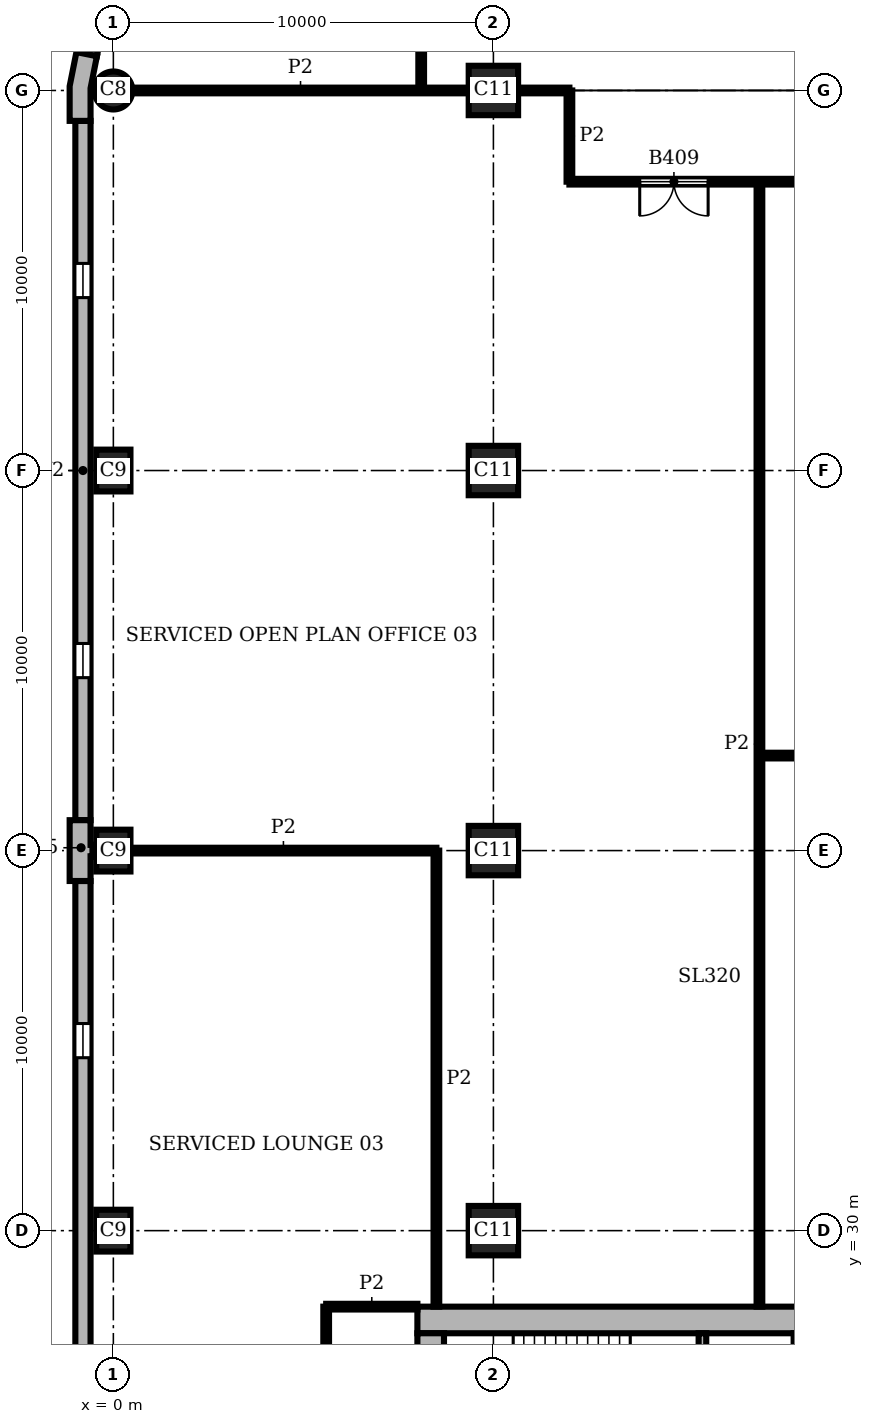
"""IFC4 building model, lengths in metres.
Left out: names, types, materials, properties, quantities, classifications, styles, units other than length and angle.
Written with IfcOpenShell. Run it as: python <this file> out.ifc"""

import sys

from ifc_helpers import new_model, si_unit, direction, frame, frame_2d, origin, origin_2d, place, context, subcontext, project, spatial, polyline, rectangle, circle, outline, extrude, element, fill, save


model = new_model("IFC4")
c1 = context("Model", 3, precision=1e-05, world=origin(), true_north=direction((0.0, 1.0)))
c2 = subcontext(c1, "Body", "Model", "MODEL_VIEW")
j1 = project(units=[si_unit("LENGTHUNIT", "METRE"), si_unit("PLANEANGLEUNIT", "RADIAN")], contexts=[c1])
p1 = place(None, origin())
s1 = spatial("IfcSite", under=j1, at=p1, CompositionType="ELEMENT")
p2 = place(p1, origin())
s2 = spatial("IfcBuilding", under=s1, at=p2, CompositionType="ELEMENT")
p3 = place(p2, frame((0.0, 0.0, 166.8)))
s3 = spatial("IfcBuildingStorey", under=s2, at=p3, CompositionType="ELEMENT", Elevation=166.8)
p4 = place(p3, frame((0.0, 60.0, 0.0), z_axis=(0.0, 0.0, 1.0), x_axis=(1.0, 0.0, 0.0)))
e1 = element("IfcColumn", 1, at=p4, inside=s3, PredefinedType="COLUMN", context=c2, shape_type="SweptSolid", body=[
    extrude(circle(Radius=0.5, at=origin_2d()), origin(), (0.0, 0.0, 1.0), 3.9),
])
for number, where, z_axis, x_axis in (
    (2, (0.0, 50.0, 0.0), (0.0, 0.0, 1.0), (0.0, 1.0, 0.0)),
    (3, (0.0, 40.0, 0.0), (0.0, 0.0, 1.0), (0.0, 1.0, 0.0)),
    (4, (0.0, 30.0, 0.0), (0.0, 0.0, 1.0), (0.0, 1.0, 0.0)),
):
    element("IfcColumn", number, at=place(p3, frame(where, z_axis=z_axis, x_axis=x_axis)), inside=s3, PredefinedType="COLUMN", context=c2, shape_type="SweptSolid", body=[
        extrude(rectangle(XDim=1.1, YDim=0.9, at=origin_2d()), origin(), (0.0, 0.0, 1.0), 3.9),
    ])
for number, where, z_axis, x_axis in (
    (5, (10.0, 30.0, 0.0), (0.0, 0.0, 1.0), (1.0, 0.0, 0.0)),
    (6, (10.0, 40.0, 0.0), (0.0, 0.0, 1.0), (1.0, 0.0, 0.0)),
    (7, (10.0, 50.0, 0.0), (0.0, 0.0, 1.0), (1.0, 0.0, 0.0)),
    (8, (10.0, 60.0, 0.0), (0.0, 0.0, 1.0), (1.0, 0.0, 0.0)),
):
    element("IfcColumn", number, at=place(p3, frame(where, z_axis=z_axis, x_axis=x_axis)), inside=s3, PredefinedType="COLUMN", context=c2, shape_type="SweptSolid", body=[
        extrude(rectangle(XDim=1.3, YDim=1.3, at=origin_2d()), origin(), (0.0, 0.0, 1.0), 3.9),
    ])
p5 = place(p3, frame((28.0, 27.65, 0.0), z_axis=(0.0, 0.0, 1.0), x_axis=(-1.0, 0.0, 0.0)))
e9 = element("IfcWall", 9, at=p5, inside=s3, PredefinedType="SHEAR", context=c2, shape_type="SweptSolid", body=[
    extrude(rectangle(XDim=20.0, YDim=0.7, at=frame_2d((10.0, 0.0))), origin(), (0.0, 0.0, 1.0), 3.9),
])
p6 = place(p3, frame((8.35, 27.3, 0.0), z_axis=(0.0, 0.0, 1.0), x_axis=(0.0, -1.0, 0.0)))
e10 = element("IfcWall", 10, at=p6, inside=s3, PredefinedType="SHEAR", context=c2, shape_type="SweptSolid", body=[
    extrude(rectangle(XDim=18.6, YDim=0.7, at=frame_2d((9.3, 0.0))), origin(), (0.0, 0.0, 1.0), 3.9),
])
p7 = place(p3, origin())
e11 = element("IfcWall", 11, at=p7, inside=s3, PredefinedType="SOLIDWALL", context=c2, shape_type="SweptSolid", body=[
    extrude(outline(polyline([(-0.825, 60.98), (-0.972, 61.009), (-1.15, 60.113), (-1.15, 59.2), (-1.0, 59.2), (-0.6, 59.2), (-0.6, 60.059), (-0.432, 60.902), (-0.825, 60.98)])), origin(), (0.0, 0.0, 1.0), 3.9),
])
e12 = element("IfcWall", 12, at=p7, inside=s3, PredefinedType="SOLIDWALL", context=c2, shape_type="SweptSolid", body=[
    extrude(outline(polyline([(-0.6, 39.2), (-0.6, 39.85), (-0.55, 39.85), (-0.55, 40.15), (-0.6, 40.15), (-0.6, 40.8), (-1.0, 40.8), (-1.15, 40.8), (-1.15, 40.0), (-1.15, 39.2), (-1.0, 39.2), (-0.6, 39.2)])), origin(), (0.0, 0.0, 1.0), 3.9),
])
p8 = place(p3, frame((0.299, 65.602, 0.0), z_axis=(0.0, 0.0, 1.0), x_axis=(-0.195098533057, -0.98078364709, 0.0)))
e13 = element("IfcWall", 13, at=p8, inside=s3, PredefinedType="SOLIDWALL", context=c2, shape_type="SweptSolid", body=[
    extrude(rectangle(XDim=4.753, YDim=0.4, at=frame_2d((2.376, 0.0))), origin(), (0.0, 0.0, 1.0), 3.9),
])
p9 = place(p8, frame((0.226, 0.0, 0.9)))
e14 = element("IfcOpeningElement", 14, at=p9, cuts=e13, PredefinedType="OPENING", context=c2, shape_type="SweptSolid", body=[
    extrude(rectangle(XDim=4.3, YDim=2.35, at=frame_2d((2.15, 1.175))), frame((0.0, 0.21, 0.0), z_axis=(0.0, -1.0, 0.0), x_axis=(1.0, 0.0, 0.0)), (0.0, 0.0, 1.0), 0.42),
])
p10 = place(p3, frame((-0.8, 59.2, 0.0), z_axis=(0.0, 0.0, 1.0), x_axis=(0.0, -1.0, 0.0)))
e15 = element("IfcWall", 15, at=p10, inside=s3, PredefinedType="SOLIDWALL", context=c2, shape_type="SweptSolid", body=[
    extrude(rectangle(XDim=18.4, YDim=0.4, at=frame_2d((9.2, 0.0))), origin(), (0.0, 0.0, 1.0), 3.9),
])
p11 = place(p10, frame((3.75, 0.0, 0.9)))
e16 = element("IfcOpeningElement", 16, at=p11, cuts=e15, PredefinedType="OPENING", context=c2, shape_type="SweptSolid", body=[
    extrude(rectangle(XDim=0.9, YDim=2.35, at=frame_2d((0.45, 1.175))), frame((0.0, 0.21, 0.0), z_axis=(0.0, -1.0, 0.0), x_axis=(1.0, 0.0, 0.0)), (0.0, 0.0, 1.0), 0.42),
])
p12 = place(p10, frame((13.75, 0.0, 0.9)))
e17 = element("IfcOpeningElement", 17, at=p12, cuts=e15, PredefinedType="OPENING", context=c2, shape_type="SweptSolid", body=[
    extrude(rectangle(XDim=0.9, YDim=2.35, at=frame_2d((0.45, 1.175))), frame((0.0, 0.21, 0.0), z_axis=(0.0, -1.0, 0.0), x_axis=(1.0, 0.0, 0.0)), (0.0, 0.0, 1.0), 0.42),
])
p13 = place(p3, frame((-0.8, 39.2, 0.0), z_axis=(0.0, 0.0, 1.0), x_axis=(0.0, -1.0, 0.0)))
e18 = element("IfcWall", 18, at=p13, inside=s3, PredefinedType="SOLIDWALL", context=c2, shape_type="SweptSolid", body=[
    extrude(rectangle(XDim=18.4, YDim=0.4, at=frame_2d((9.2, 0.0))), origin(), (0.0, 0.0, 1.0), 3.9),
])
p14 = place(p13, frame((3.75, 0.0, 0.9)))
e19 = element("IfcOpeningElement", 19, at=p14, cuts=e18, PredefinedType="OPENING", context=c2, shape_type="SweptSolid", body=[
    extrude(rectangle(XDim=0.9, YDim=2.35, at=frame_2d((0.45, 1.175))), frame((0.0, 0.21, 0.0), z_axis=(0.0, -1.0, 0.0), x_axis=(1.0, 0.0, 0.0)), (0.0, 0.0, 1.0), 0.42),
])
p15 = place(p13, frame((13.75, 0.0, 0.9)))
e20 = element("IfcOpeningElement", 20, at=p15, cuts=e18, PredefinedType="OPENING", context=c2, shape_type="SweptSolid", body=[
    extrude(rectangle(XDim=0.9, YDim=2.35, at=frame_2d((0.45, 1.175))), frame((0.0, 0.21, 0.0), z_axis=(0.0, -1.0, 0.0), x_axis=(1.0, 0.0, 0.0)), (0.0, 0.0, 1.0), 0.42),
])
p16 = place(p3, frame((15.5, 23.6, 0.0), z_axis=(0.0, 0.0, 1.0), x_axis=(0.0, 1.0, 0.0)))
e21 = element("IfcWall", 21, at=p16, inside=s3, PredefinedType="SHEAR", context=c2, shape_type="SweptSolid", body=[
    extrude(rectangle(XDim=3.7, YDim=0.2, at=frame_2d((1.85, 0.0))), origin(), (0.0, 0.0, 1.0), 3.58),
])
p17 = place(p3, frame((18.0, 20.0, 0.0), z_axis=(0.0, 0.0, 1.0), x_axis=(0.0, 1.0, 0.0)))
e22 = element("IfcWall", 22, at=p17, inside=s3, PredefinedType="SHEAR", context=c2, shape_type="SweptSolid", body=[
    extrude(rectangle(XDim=7.3, YDim=0.2, at=frame_2d((3.65, 0.0))), origin(), (0.0, 0.0, 1.0), 3.58),
])
p18 = place(p17, frame((1.2, 0.0, 0.0)))
e23 = element("IfcOpeningElement", 23, at=p18, cuts=e22, PredefinedType="OPENING", context=c2, shape_type="SweptSolid", body=[
    extrude(rectangle(XDim=1.2, YDim=2.1, at=frame_2d((0.6, 1.05))), frame((0.0, 0.11, 0.0), z_axis=(0.0, -1.0, 0.0), x_axis=(1.0, 0.0, 0.0)), (0.0, 0.0, 1.0), 0.22),
])
p19 = place(p3, frame((5.6, 5.6, 0.0), z_axis=(0.0, 0.0, 1.0), x_axis=(0.0, 1.0, 0.0)))
e24 = element("IfcWall", 24, at=p19, inside=s3, PredefinedType="PARTITIONING", context=c2, shape_type="SweptSolid", body=[
    extrude(rectangle(XDim=22.4, YDim=0.15, at=frame_2d((11.2, 0.0))), origin(), (0.0, 0.0, 1.0), 3.58),
])
p20 = place(p19, frame((5.35, 0.0, 0.0)))
e25 = element("IfcOpeningElement", 25, at=p20, cuts=e24, PredefinedType="OPENING", context=c2, shape_type="SweptSolid", body=[
    extrude(rectangle(XDim=1.0, YDim=2.1, at=frame_2d((0.5, 1.05))), frame((0.0, 0.085, 0.0), z_axis=(0.0, -1.0, 0.0), x_axis=(1.0, 0.0, 0.0)), (0.0, 0.0, 1.0), 0.17),
])
p21 = place(p19, frame((11.25, 0.0, 0.0)))
e26 = element("IfcOpeningElement", 26, at=p21, cuts=e24, PredefinedType="OPENING", context=c2, shape_type="SweptSolid", body=[
    extrude(rectangle(XDim=1.0, YDim=2.1, at=frame_2d((0.5, 1.05))), frame((0.0, 0.085, 0.0), z_axis=(0.0, -1.0, 0.0), x_axis=(1.0, 0.0, 0.0)), (0.0, 0.0, 1.0), 0.17),
])
p22 = place(p19, frame((18.25, 0.0, 0.0)))
e27 = element("IfcOpeningElement", 27, at=p22, cuts=e24, PredefinedType="OPENING", context=c2, shape_type="SweptSolid", body=[
    extrude(rectangle(XDim=1.8, YDim=2.1, at=frame_2d((0.9, 1.05))), frame((0.0, 0.085, 0.0), z_axis=(0.0, -1.0, 0.0), x_axis=(1.0, 0.0, 0.0)), (0.0, 0.0, 1.0), 0.17),
])
p23 = place(p3, frame((8.1, 60.0, 0.0), z_axis=(0.0, 0.0, 1.0), x_axis=(0.0, 1.0, 0.0)))
e28 = element("IfcWall", 28, at=p23, inside=s3, PredefinedType="PARTITIONING", context=c2, shape_type="SweptSolid", body=[
    extrude(rectangle(XDim=6.4, YDim=0.15, at=frame_2d((3.2, 0.0))), origin(), (0.0, 0.0, 1.0), 3.58),
])
p24 = place(p23, frame((2.35, 0.0, 0.0)))
e29 = element("IfcOpeningElement", 29, at=p24, cuts=e28, PredefinedType="OPENING", context=c2, shape_type="SweptSolid", body=[
    extrude(rectangle(XDim=1.8, YDim=2.1, at=frame_2d((0.9, 1.05))), frame((0.0, 0.085, 0.0), z_axis=(0.0, -1.0, 0.0), x_axis=(1.0, 0.0, 0.0)), (0.0, 0.0, 1.0), 0.17),
])
p25 = place(p3, frame((8.5, 28.0, 0.0), z_axis=(0.0, 0.0, 1.0), x_axis=(0.0, 1.0, 0.0)))
e30 = element("IfcWall", 30, at=p25, inside=s3, PredefinedType="PARTITIONING", context=c2, shape_type="SweptSolid", body=[
    extrude(rectangle(XDim=12.0, YDim=0.15, at=frame_2d((6.0, 0.0))), origin(), (0.0, 0.0, 1.0), 3.58),
])
p26 = place(p3, frame((12.0, 57.6, 0.0), z_axis=(0.0, 0.0, 1.0), x_axis=(0.0, 1.0, 0.0)))
e31 = element("IfcWall", 31, at=p26, inside=s3, PredefinedType="PARTITIONING", context=c2, shape_type="SweptSolid", body=[
    extrude(rectangle(XDim=2.4, YDim=0.15, at=frame_2d((1.2, 0.0))), origin(), (0.0, 0.0, 1.0), 3.58),
])
p27 = place(p3, frame((17.0, 28.0, 0.0), z_axis=(0.0, 0.0, 1.0), x_axis=(0.0, 1.0, 0.0)))
e32 = element("IfcWall", 32, at=p27, inside=s3, PredefinedType="PARTITIONING", context=c2, shape_type="SweptSolid", body=[
    extrude(rectangle(XDim=29.6, YDim=0.15, at=frame_2d((14.8, 0.0))), origin(), (0.0, 0.0, 1.0), 3.58),
])
p28 = place(p3, frame((5.6, 28.0, 0.0), z_axis=(0.0, 0.0, 1.0), x_axis=(1.0, 0.0, 0.0)))
e33 = element("IfcWall", 33, at=p28, inside=s3, PredefinedType="PARTITIONING", context=c2, shape_type="SweptSolid", body=[
    extrude(rectangle(XDim=2.4, YDim=0.15, at=frame_2d((1.2, 0.0))), origin(), (0.0, 0.0, 1.0), 3.58),
])
p29 = place(p3, frame((0.45, 40.0, 0.0), z_axis=(0.0, 0.0, 1.0), x_axis=(1.0, 0.0, 0.0)))
e34 = element("IfcWall", 34, at=p29, inside=s3, PredefinedType="PARTITIONING", context=c2, shape_type="SweptSolid", body=[
    extrude(rectangle(XDim=8.05, YDim=0.15, at=frame_2d((4.025, 0.0))), origin(), (0.0, 0.0, 1.0), 3.58),
])
p30 = place(p3, frame((17.0, 42.5, 0.0), z_axis=(0.0, 0.0, 1.0), x_axis=(1.0, 0.0, 0.0)))
e35 = element("IfcWall", 35, at=p30, inside=s3, PredefinedType="PARTITIONING", context=c2, shape_type="SweptSolid", body=[
    extrude(rectangle(XDim=9.0, YDim=0.15, at=frame_2d((4.5, 0.0))), origin(), (0.0, 0.0, 1.0), 3.58),
])
p31 = place(p3, frame((12.0, 57.6, 0.0), z_axis=(0.0, 0.0, 1.0), x_axis=(1.0, 0.0, 0.0)))
e36 = element("IfcWall", 36, at=p31, inside=s3, PredefinedType="PARTITIONING", context=c2, shape_type="SweptSolid", body=[
    extrude(rectangle(XDim=14.0, YDim=0.15, at=frame_2d((7.0, 0.0))), origin(), (0.0, 0.0, 1.0), 3.58),
])
p32 = place(p31, frame((1.85, 0.0, 0.0)))
e37 = element("IfcOpeningElement", 37, at=p32, cuts=e36, PredefinedType="OPENING", context=c2, shape_type="SweptSolid", body=[
    extrude(rectangle(XDim=1.8, YDim=2.1, at=frame_2d((0.9, 1.05))), frame((0.0, 0.085, 0.0), z_axis=(0.0, -1.0, 0.0), x_axis=(1.0, 0.0, 0.0)), (0.0, 0.0, 1.0), 0.17),
])
p33 = place(p3, frame((0.5, 60.0, 0.0), z_axis=(0.0, 0.0, 1.0), x_axis=(1.0, 0.0, 0.0)))
e38 = element("IfcWall", 38, at=p33, inside=s3, PredefinedType="PARTITIONING", context=c2, shape_type="SweptSolid", body=[
    extrude(rectangle(XDim=8.85, YDim=0.15, at=frame_2d((4.425, 0.0))), origin(), (0.0, 0.0, 1.0), 3.58),
])
p34 = place(p3, frame((10.65, 60.0, 0.0), z_axis=(0.0, 0.0, 1.0), x_axis=(1.0, 0.0, 0.0)))
e39 = element("IfcWall", 39, at=p34, inside=s3, PredefinedType="PARTITIONING", context=c2, shape_type="SweptSolid", body=[
    extrude(rectangle(XDim=1.35, YDim=0.15, at=frame_2d((0.675, 0.0))), origin(), (0.0, 0.0, 1.0), 3.58),
])
p35 = place(p11, origin())
e40 = element("IfcWindow", 40, at=p35, inside=s3, PartitioningType="SINGLE_PANEL", PredefinedType="WINDOW", context=c2, shape_type="SweptSolid", body=[
    extrude(rectangle(XDim=0.9, YDim=2.35, at=frame_2d((0.45, 1.175))), frame((0.0, 0.16, 0.0), z_axis=(0.0, -1.0, 0.0), x_axis=(1.0, 0.0, 0.0)), (0.0, 0.0, 1.0), 0.06),
])
fill(e16, e40)
p36 = place(p12, origin())
e41 = element("IfcWindow", 41, at=p36, inside=s3, PartitioningType="SINGLE_PANEL", PredefinedType="WINDOW", context=c2, shape_type="SweptSolid", body=[
    extrude(rectangle(XDim=0.9, YDim=2.35, at=frame_2d((0.45, 1.175))), frame((0.0, 0.16, 0.0), z_axis=(0.0, -1.0, 0.0), x_axis=(1.0, 0.0, 0.0)), (0.0, 0.0, 1.0), 0.06),
])
fill(e17, e41)
p37 = place(p14, origin())
e42 = element("IfcWindow", 42, at=p37, inside=s3, PartitioningType="SINGLE_PANEL", PredefinedType="WINDOW", context=c2, shape_type="SweptSolid", body=[
    extrude(rectangle(XDim=0.9, YDim=2.35, at=frame_2d((0.45, 1.175))), frame((0.0, 0.16, 0.0), z_axis=(0.0, -1.0, 0.0), x_axis=(1.0, 0.0, 0.0)), (0.0, 0.0, 1.0), 0.06),
])
fill(e19, e42)
p38 = place(p32, frame((1.8, 0.0, 0.0), z_axis=(0.0, 0.0, 1.0), x_axis=(-1.0, 0.0, 0.0)))
e43 = element("IfcDoor", 43, at=p38, inside=s3, OperationType="DOUBLE_DOOR_SINGLE_SWING", PredefinedType="DOOR", context=c2, shape_type="SweptSolid", body=[
    extrude(rectangle(XDim=1.8, YDim=2.1, at=frame_2d((0.9, 1.05))), frame((0.0, 0.025, 0.0), z_axis=(0.0, -1.0, 0.0), x_axis=(1.0, 0.0, 0.0)), (0.0, 0.0, 1.0), 0.05),
])
fill(e37, e43)
save(model, sys.argv[1])
